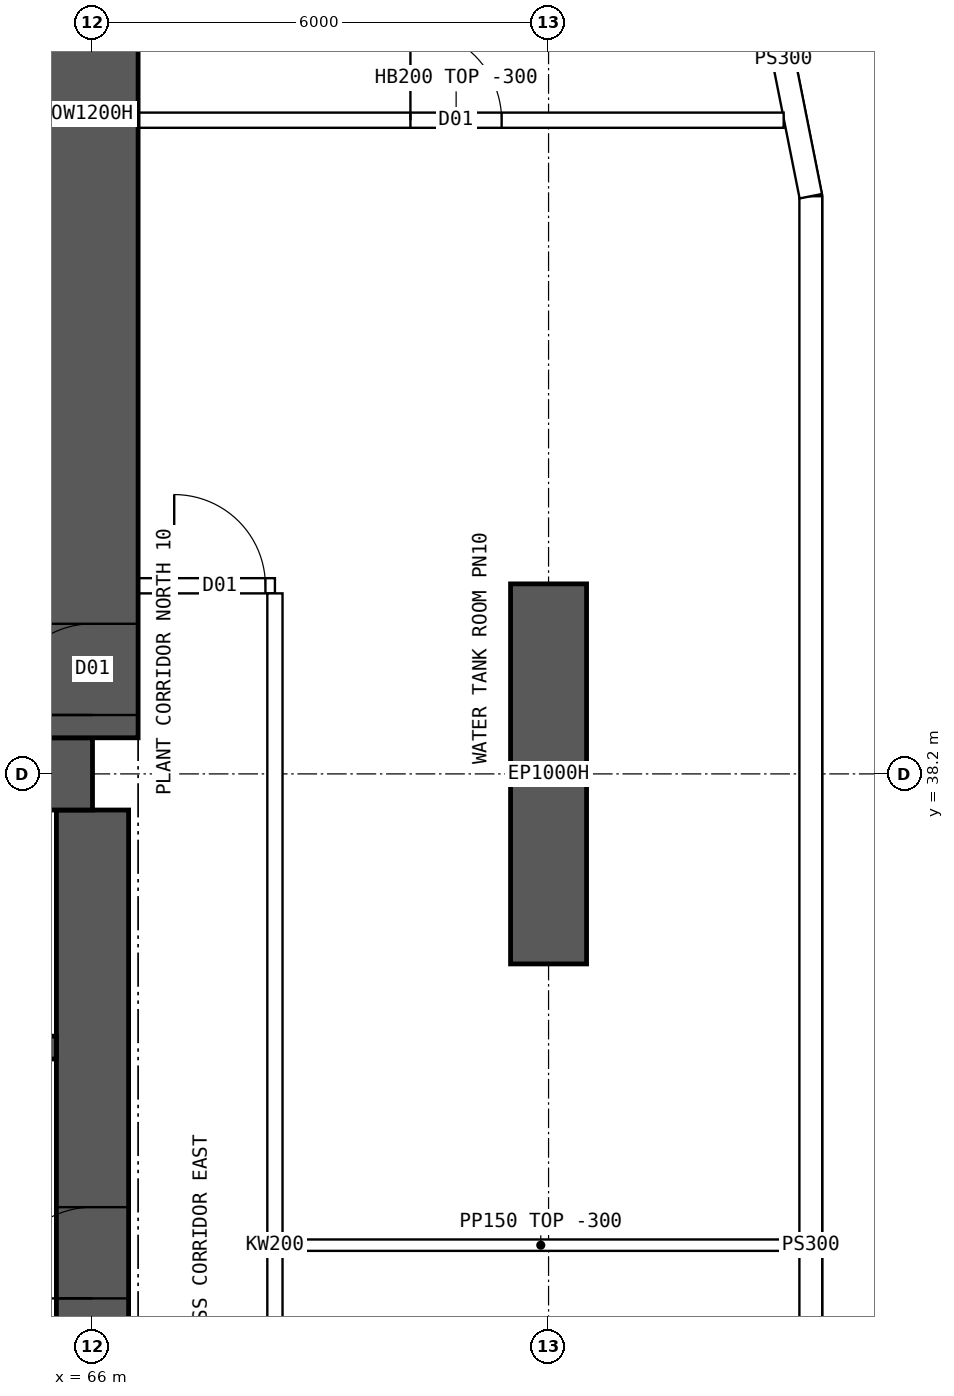
"""IFC4 building model, lengths in metres.
Left out: names, types, materials, properties, quantities, classifications, styles, units other than length and angle.
Written with IfcOpenShell. Run it as: python <this file> out.ifc"""

import sys

from ifc_helpers import new_model, si_unit, direction, frame, frame_2d, origin, place, context, subcontext, project, spatial, polyline, rectangle, outline, extrude, clip, halfspace, element, fill, save


model = new_model("IFC4")
c1 = context("Model", 3, precision=1e-05, world=origin(), true_north=direction((0.0, 1.0)))
c2 = subcontext(c1, "Body", "Model", "MODEL_VIEW")
j1 = project(units=[si_unit("LENGTHUNIT", "METRE"), si_unit("PLANEANGLEUNIT", "RADIAN")], contexts=[c1])
p1 = place(None, origin())
s1 = spatial("IfcSite", under=j1, at=p1, CompositionType="ELEMENT")
p2 = place(p1, origin())
s2 = spatial("IfcBuilding", under=s1, at=p2, CompositionType="ELEMENT")
p3 = place(p2, frame((0.0, 0.0, 133.15)))
s3 = spatial("IfcBuildingStorey", under=s2, at=p3, CompositionType="ELEMENT", Elevation=133.15)
p4 = place(p3, frame((72.0, 35.7, 0.0), z_axis=(0.0, 0.0, 1.0), x_axis=(0.0, 1.0, 0.0)))
e1 = element("IfcWall", 1, at=p4, inside=s3, PredefinedType="SHEAR", context=c2, shape_type="SweptSolid", body=[
    extrude(rectangle(XDim=5.0, YDim=1.0, at=frame_2d((2.5, 0.0))), origin(), (0.0, 0.0, 1.0), 7.2),
])
p5 = place(p3, frame((18.0, 38.2, 0.0), z_axis=(0.0, 0.0, 1.0), x_axis=(1.0, 0.0, 0.0)))
e2 = element("IfcWall", 2, at=p5, inside=s3, PredefinedType="SHEAR", context=c2, shape_type="SweptSolid", body=[
    extrude(rectangle(XDim=48.0, YDim=0.95, at=frame_2d((24.0, 0.0))), origin(), (0.0, 0.0, 1.0), 7.2),
])
p6 = place(p3, frame((66.0, 26.275, 0.0), z_axis=(0.0, 0.0, 1.0), x_axis=(0.0, 1.0, 0.0)))
e3 = element("IfcWall", 3, at=p6, inside=s3, PredefinedType="SHEAR", context=c2, shape_type="SweptSolid", body=[
    extrude(rectangle(XDim=11.45, YDim=0.95, at=frame_2d((5.725, 0.0))), origin(), (0.0, 0.0, 1.0), 7.2),
])
p7 = place(p6, frame((5.025, 0.0, 0.0)))
e4 = element("IfcOpeningElement", 4, at=p7, cuts=e3, PredefinedType="OPENING", context=c2, shape_type="SweptSolid", body=[
    extrude(rectangle(XDim=1.2, YDim=2.1, at=frame_2d((0.6, 1.05))), frame((0.0, 0.485, 0.0), z_axis=(0.0, -1.0, 0.0), x_axis=(1.0, 0.0, 0.0)), (0.0, 0.0, 1.0), 0.97),
])
p8 = place(p3, frame((18.475, 34.6, 0.0), z_axis=(0.0, 0.0, 1.0), x_axis=(1.0, 0.0, 0.0)))
e5 = element("IfcWall", 5, at=p8, inside=s3, PredefinedType="SHEAR", context=c2, shape_type="SweptSolid", body=[
    extrude(rectangle(XDim=47.05, YDim=0.3, at=frame_2d((23.525, 0.0))), origin(), (0.0, 0.0, 1.0), 7.2),
])
p9 = place(p8, frame((0.9, 0.0, 0.0)))
e6 = element("IfcOpeningElement", 6, at=p9, cuts=e5, PredefinedType="OPENING", context=c2, shape_type="SweptSolid", body=[
    extrude(rectangle(XDim=1.1, YDim=2.1, at=frame_2d((0.55, 1.05))), frame((0.0, 0.16, 0.0), z_axis=(0.0, -1.0, 0.0), x_axis=(1.0, 0.0, 0.0)), (0.0, 0.0, 1.0), 0.32),
])
p10 = place(p8, frame((45.05, 0.0, 0.0)))
e7 = element("IfcOpeningElement", 7, at=p10, cuts=e5, PredefinedType="OPENING", context=c2, shape_type="SweptSolid", body=[
    extrude(rectangle(XDim=1.1, YDim=2.1, at=frame_2d((0.55, 1.05))), frame((0.0, 0.16, 0.0), z_axis=(0.0, -1.0, 0.0), x_axis=(1.0, 0.0, 0.0)), (0.0, 0.0, 1.0), 0.32),
])
p11 = place(p8, frame((4.125, 0.0, 0.0)))
e8 = element("IfcOpeningElement", 8, at=p11, cuts=e5, PredefinedType="OPENING", context=c2, shape_type="SweptSolid", body=[
    extrude(rectangle(XDim=0.9, YDim=2.1, at=frame_2d((0.45, 1.05))), frame((0.0, 0.16, 0.0), z_axis=(0.0, -1.0, 0.0), x_axis=(1.0, 0.0, 0.0)), (0.0, 0.0, 1.0), 0.32),
])
p12 = place(p8, frame((42.025, 0.0, 0.0)))
e9 = element("IfcOpeningElement", 9, at=p12, cuts=e5, PredefinedType="OPENING", context=c2, shape_type="SweptSolid", body=[
    extrude(rectangle(XDim=0.9, YDim=2.1, at=frame_2d((0.45, 1.05))), frame((0.0, 0.16, 0.0), z_axis=(0.0, -1.0, 0.0), x_axis=(1.0, 0.0, 0.0)), (0.0, 0.0, 1.0), 0.32),
])
p13 = place(p8, frame((8.9, 0.0, 0.0)))
e10 = element("IfcOpeningElement", 10, at=p13, cuts=e5, PredefinedType="OPENING", context=c2, shape_type="SweptSolid", body=[
    extrude(rectangle(XDim=0.9, YDim=2.1, at=frame_2d((0.45, 1.05))), frame((0.0, 0.16, 0.0), z_axis=(0.0, -1.0, 0.0), x_axis=(1.0, 0.0, 0.0)), (0.0, 0.0, 1.0), 0.32),
])
p14 = place(p8, frame((12.874, 0.0, 0.0)))
e11 = element("IfcOpeningElement", 11, at=p14, cuts=e5, PredefinedType="OPENING", context=c2, shape_type="SweptSolid", body=[
    extrude(rectangle(XDim=0.9, YDim=2.1, at=frame_2d((0.45, 1.05))), frame((0.0, 0.16, 0.0), z_axis=(0.0, -1.0, 0.0), x_axis=(1.0, 0.0, 0.0)), (0.0, 0.0, 1.0), 0.32),
])
p15 = place(p8, frame((16.521, 0.0, 0.0)))
e12 = element("IfcOpeningElement", 12, at=p15, cuts=e5, PredefinedType="OPENING", context=c2, shape_type="SweptSolid", body=[
    extrude(rectangle(XDim=0.9, YDim=2.1, at=frame_2d((0.45, 1.05))), frame((0.0, 0.16, 0.0), z_axis=(0.0, -1.0, 0.0), x_axis=(1.0, 0.0, 0.0)), (0.0, 0.0, 1.0), 0.32),
])
p16 = place(p8, frame((20.28, 0.0, 0.0)))
e13 = element("IfcOpeningElement", 13, at=p16, cuts=e5, PredefinedType="OPENING", context=c2, shape_type="SweptSolid", body=[
    extrude(rectangle(XDim=0.9, YDim=2.1, at=frame_2d((0.45, 1.05))), frame((0.0, 0.16, 0.0), z_axis=(0.0, -1.0, 0.0), x_axis=(1.0, 0.0, 0.0)), (0.0, 0.0, 1.0), 0.32),
])
p17 = place(p8, frame((24.686, 0.0, 0.0)))
e14 = element("IfcOpeningElement", 14, at=p17, cuts=e5, PredefinedType="OPENING", context=c2, shape_type="SweptSolid", body=[
    extrude(rectangle(XDim=0.9, YDim=2.1, at=frame_2d((0.45, 1.05))), frame((0.0, 0.16, 0.0), z_axis=(0.0, -1.0, 0.0), x_axis=(1.0, 0.0, 0.0)), (0.0, 0.0, 1.0), 0.32),
])
p18 = place(p8, frame((27.483, 0.0, 0.0)))
e15 = element("IfcOpeningElement", 15, at=p18, cuts=e5, PredefinedType="OPENING", context=c2, shape_type="SweptSolid", body=[
    extrude(rectangle(XDim=0.9, YDim=2.1, at=frame_2d((0.45, 1.05))), frame((0.0, 0.16, 0.0), z_axis=(0.0, -1.0, 0.0), x_axis=(1.0, 0.0, 0.0)), (0.0, 0.0, 1.0), 0.32),
])
p19 = place(p8, frame((33.604, 0.0, 0.0)))
e16 = element("IfcOpeningElement", 16, at=p19, cuts=e5, PredefinedType="OPENING", context=c2, shape_type="SweptSolid", body=[
    extrude(rectangle(XDim=0.9, YDim=2.1, at=frame_2d((0.45, 1.05))), frame((0.0, 0.16, 0.0), z_axis=(0.0, -1.0, 0.0), x_axis=(1.0, 0.0, 0.0)), (0.0, 0.0, 1.0), 0.32),
])
p20 = place(p3, frame((66.0, 38.675, 0.0), z_axis=(0.0, 0.0, 1.0), x_axis=(0.0, 1.0, 0.0)))
e17 = element("IfcWall", 17, at=p20, inside=s3, PredefinedType="SHEAR", context=c2, shape_type="SweptSolid", body=[
    extrude(rectangle(XDim=16.425, YDim=1.2, at=frame_2d((8.212, 0.0))), origin(), (0.0, 0.0, 1.0), 7.2),
])
p21 = place(p20, frame((0.3, 0.0, 0.0)))
e18 = element("IfcOpeningElement", 18, at=p21, cuts=e17, PredefinedType="OPENING", context=c2, shape_type="SweptSolid", body=[
    extrude(rectangle(XDim=1.2, YDim=2.1, at=frame_2d((0.6, 1.05))), frame((0.0, 0.61, 0.0), z_axis=(0.0, -1.0, 0.0), x_axis=(1.0, 0.0, 0.0)), (0.0, 0.0, 1.0), 1.22),
])
p22 = place(p20, frame((11.375, 0.0, 0.0)))
e19 = element("IfcOpeningElement", 19, at=p22, cuts=e17, PredefinedType="OPENING", context=c2, shape_type="SweptSolid", body=[
    extrude(rectangle(XDim=1.2, YDim=2.1, at=frame_2d((0.6, 1.05))), frame((0.0, 0.61, 0.0), z_axis=(0.0, -1.0, 0.0), x_axis=(1.0, 0.0, 0.0)), (0.0, 0.0, 1.0), 1.22),
])
p23 = place(p3, frame((75.45, 18.2, 0.0), z_axis=(0.0, 0.0, 1.0), x_axis=(0.0, 1.0, 0.0)))
e20 = element("IfcWall", 20, at=p23, inside=s3, PredefinedType="SOLIDWALL", context=c2, shape_type="SweptSolid", body=[
    extrude(outline(polyline([(-0.015, -0.15), (27.615, -0.15), (27.585, 0.15), (0.015, 0.15), (-0.015, -0.15)])), origin(), (0.0, 0.0, 1.0), 6.9),
])
p24 = place(p3, frame((75.45, 45.8, 0.0), z_axis=(0.0, 0.0, 1.0), x_axis=(-0.195059183267, 0.980791473772, 0.0)))
e21 = element("IfcWall", 21, at=p24, inside=s3, PredefinedType="SOLIDWALL", context=c2, shape_type="SweptSolid", body=[
    extrude(outline(polyline([(-0.015, -0.15), (3.717, -0.15), (3.657, 0.15), (0.015, 0.15), (-0.015, -0.15)])), origin(), (0.0, 0.0, 1.0), 6.9),
])
p25 = place(p3, frame((15.6, 40.675, 0.0), z_axis=(0.0, 0.0, 1.0), x_axis=(1.0, 0.0, 0.0)))
e22 = element("IfcWall", 22, at=p25, inside=s3, PredefinedType="SOLIDWALL", context=c2, shape_type="SweptSolid", body=[
    extrude(rectangle(XDim=52.8, YDim=0.2, at=frame_2d((26.4, 0.0))), origin(), (0.0, 0.0, 1.0), 6.9),
])
p26 = place(p25, frame((0.6, 0.0, 0.0)))
e23 = element("IfcOpeningElement", 23, at=p26, cuts=e22, PredefinedType="OPENING", context=c2, shape_type="SweptSolid", body=[
    extrude(rectangle(XDim=1.2, YDim=2.1, at=frame_2d((0.6, 1.05))), frame((0.0, 0.11, 0.0), z_axis=(0.0, -1.0, 0.0), x_axis=(1.0, 0.0, 0.0)), (0.0, 0.0, 1.0), 0.22),
])
p27 = place(p25, frame((3.475, 0.0, 0.0)))
e24 = element("IfcOpeningElement", 24, at=p27, cuts=e22, PredefinedType="OPENING", context=c2, shape_type="SweptSolid", body=[
    extrude(rectangle(XDim=1.8, YDim=2.4, at=frame_2d((0.9, 1.2))), frame((0.0, 0.11, 0.0), z_axis=(0.0, -1.0, 0.0), x_axis=(1.0, 0.0, 0.0)), (0.0, 0.0, 1.0), 0.22),
])
p28 = place(p25, frame((9.475, 0.0, 0.0)))
e25 = element("IfcOpeningElement", 25, at=p28, cuts=e22, PredefinedType="OPENING", context=c2, shape_type="SweptSolid", body=[
    extrude(rectangle(XDim=1.8, YDim=2.4, at=frame_2d((0.9, 1.2))), frame((0.0, 0.11, 0.0), z_axis=(0.0, -1.0, 0.0), x_axis=(1.0, 0.0, 0.0)), (0.0, 0.0, 1.0), 0.22),
])
p29 = place(p25, frame((15.475, 0.0, 0.0)))
e26 = element("IfcOpeningElement", 26, at=p29, cuts=e22, PredefinedType="OPENING", context=c2, shape_type="SweptSolid", body=[
    extrude(rectangle(XDim=1.8, YDim=2.4, at=frame_2d((0.9, 1.2))), frame((0.0, 0.11, 0.0), z_axis=(0.0, -1.0, 0.0), x_axis=(1.0, 0.0, 0.0)), (0.0, 0.0, 1.0), 0.22),
])
p30 = place(p25, frame((21.475, 0.0, 0.0)))
e27 = element("IfcOpeningElement", 27, at=p30, cuts=e22, PredefinedType="OPENING", context=c2, shape_type="SweptSolid", body=[
    extrude(rectangle(XDim=1.8, YDim=2.4, at=frame_2d((0.9, 1.2))), frame((0.0, 0.11, 0.0), z_axis=(0.0, -1.0, 0.0), x_axis=(1.0, 0.0, 0.0)), (0.0, 0.0, 1.0), 0.22),
])
p31 = place(p25, frame((27.475, 0.0, 0.0)))
e28 = element("IfcOpeningElement", 28, at=p31, cuts=e22, PredefinedType="OPENING", context=c2, shape_type="SweptSolid", body=[
    extrude(rectangle(XDim=1.8, YDim=2.4, at=frame_2d((0.9, 1.2))), frame((0.0, 0.11, 0.0), z_axis=(0.0, -1.0, 0.0), x_axis=(1.0, 0.0, 0.0)), (0.0, 0.0, 1.0), 0.22),
])
p32 = place(p25, frame((33.475, 0.0, 0.0)))
e29 = element("IfcOpeningElement", 29, at=p32, cuts=e22, PredefinedType="OPENING", context=c2, shape_type="SweptSolid", body=[
    extrude(rectangle(XDim=1.8, YDim=2.4, at=frame_2d((0.9, 1.2))), frame((0.0, 0.11, 0.0), z_axis=(0.0, -1.0, 0.0), x_axis=(1.0, 0.0, 0.0)), (0.0, 0.0, 1.0), 0.22),
])
p33 = place(p25, frame((39.475, 0.0, 0.0)))
e30 = element("IfcOpeningElement", 30, at=p33, cuts=e22, PredefinedType="OPENING", context=c2, shape_type="SweptSolid", body=[
    extrude(rectangle(XDim=1.8, YDim=2.4, at=frame_2d((0.9, 1.2))), frame((0.0, 0.11, 0.0), z_axis=(0.0, -1.0, 0.0), x_axis=(1.0, 0.0, 0.0)), (0.0, 0.0, 1.0), 0.22),
])
p34 = place(p25, frame((45.475, 0.0, 0.0)))
e31 = element("IfcOpeningElement", 31, at=p34, cuts=e22, PredefinedType="OPENING", context=c2, shape_type="SweptSolid", body=[
    extrude(rectangle(XDim=1.8, YDim=2.4, at=frame_2d((0.9, 1.2))), frame((0.0, 0.11, 0.0), z_axis=(0.0, -1.0, 0.0), x_axis=(1.0, 0.0, 0.0)), (0.0, 0.0, 1.0), 0.22),
])
p35 = place(p25, frame((51.475, 0.0, 0.0)))
e32 = element("IfcOpeningElement", 32, at=p35, cuts=e22, PredefinedType="OPENING", context=c2, shape_type="SweptSolid", body=[
    extrude(rectangle(XDim=1.2, YDim=2.1, at=frame_2d((0.6, 1.05))), frame((0.0, 0.11, 0.0), z_axis=(0.0, -1.0, 0.0), x_axis=(1.0, 0.0, 0.0)), (0.0, 0.0, 1.0), 0.22),
])
p36 = place(p3, frame((68.4, 23.425, 0.0), z_axis=(0.0, 0.0, 1.0), x_axis=(0.0, 1.0, 0.0)))
e33 = element("IfcWall", 33, at=p36, inside=s3, PredefinedType="SOLIDWALL", context=c2, shape_type="SweptSolid", body=[
    extrude(rectangle(XDim=17.15, YDim=0.2, at=frame_2d((8.575, 0.0))), origin(), (0.0, 0.0, 1.0), 6.9),
])
p37 = place(p3, frame((60.475, 46.8, 0.0), z_axis=(0.0, 0.0, 1.0), x_axis=(1.0, 0.0, 0.0)))
e34 = element("IfcWall", 34, at=p37, inside=s3, PredefinedType="SOLIDWALL", context=c2, shape_type="SweptSolid", body=[
    extrude(rectangle(XDim=5.05, YDim=0.2, at=frame_2d((2.525, 0.0))), origin(), (0.0, 0.0, 1.0), 6.9),
])
p38 = place(p37, frame((1.925, 0.0, 0.0)))
e35 = element("IfcOpeningElement", 35, at=p38, cuts=e34, PredefinedType="OPENING", context=c2, shape_type="SweptSolid", body=[
    extrude(rectangle(XDim=1.2, YDim=2.1, at=frame_2d((0.6, 1.05))), frame((0.0, 0.11, 0.0), z_axis=(0.0, -1.0, 0.0), x_axis=(1.0, 0.0, 0.0)), (0.0, 0.0, 1.0), 0.22),
])
p39 = place(p3, frame((66.475, 46.8, 0.0), z_axis=(0.0, 0.0, 1.0), x_axis=(1.0, 0.0, 0.0)))
e36 = element("IfcWall", 36, at=p39, inside=s3, PredefinedType="SOLIDWALL", context=c2, shape_type="Clipping", body=[
    clip(clip(extrude(outline(polyline([(-0.03, 0.0), (8.648, 0.0), (8.648, 6.9), (5.827, 6.9), (5.825, 6.45), (5.227, 6.45), (5.225, 6.9), (-0.03, 6.9), (-0.03, 0.0)])), frame((0.0, 0.1, 0.0), z_axis=(0.0, -1.0, 0.0), x_axis=(1.0, 0.0, 0.0)), (0.0, 0.0, 1.0), 0.2), halfspace(frame((0.0, 0.0, 0.0), z_axis=(-1.0, 0.0, 0.0)), False)), halfspace(frame((8.618, 0.0, 0.0), z_axis=(0.98078778892, 0.195077710428, 0.0)), False)),
])
p40 = place(p39, frame((3.708, 0.0, 0.0)))
e37 = element("IfcOpeningElement", 37, at=p40, cuts=e36, PredefinedType="OPENING", context=c2, shape_type="SweptSolid", body=[
    extrude(rectangle(XDim=1.2, YDim=2.1, at=frame_2d((0.6, 1.05))), frame((0.0, 0.11, 0.0), z_axis=(0.0, -1.0, 0.0), x_axis=(1.0, 0.0, 0.0)), (0.0, 0.0, 1.0), 0.22),
])
p41 = place(p3, frame((68.5, 32.0, 0.0), z_axis=(0.0, 0.0, 1.0), x_axis=(1.0, 0.0, 0.0)))
e38 = element("IfcWall", 38, at=p41, inside=s3, PredefinedType="PARTITIONING", context=c2, shape_type="SweptSolid", body=[
    extrude(outline(polyline([(0.0, 0.0), (6.795, 0.0), (6.795, 6.9), (3.802, 6.9), (3.8, 6.45), (3.202, 6.45), (3.2, 6.9), (0.0, 6.9), (0.0, 0.0)])), frame((0.0, 0.075, 0.0), z_axis=(0.0, -1.0, 0.0), x_axis=(1.0, 0.0, 0.0)), (0.0, 0.0, 1.0), 0.15),
])
p42 = place(p7, origin())
e39 = element("IfcDoor", 39, at=p42, inside=s3, OperationType="SINGLE_SWING_LEFT", PredefinedType="DOOR", context=c2, shape_type="SweptSolid", body=[
    extrude(rectangle(XDim=1.2, YDim=2.1, at=frame_2d((0.6, 1.05))), frame((0.0, 0.025, 0.0), z_axis=(0.0, -1.0, 0.0), x_axis=(1.0, 0.0, 0.0)), (0.0, 0.0, 1.0), 0.05),
])
fill(e4, e39)
p43 = place(p40, origin())
e40 = element("IfcDoor", 40, at=p43, inside=s3, OperationType="SINGLE_SWING_LEFT", PredefinedType="DOOR", context=c2, shape_type="SweptSolid", body=[
    extrude(rectangle(XDim=1.2, YDim=2.1, at=frame_2d((0.6, 1.05))), frame((0.0, 0.025, 0.0), z_axis=(0.0, -1.0, 0.0), x_axis=(1.0, 0.0, 0.0)), (0.0, 0.0, 1.0), 0.05),
])
fill(e37, e40)
p44 = place(p35, origin())
e41 = element("IfcDoor", 41, at=p44, inside=s3, OperationType="SINGLE_SWING_LEFT", PredefinedType="DOOR", context=c2, shape_type="SweptSolid", body=[
    extrude(rectangle(XDim=1.2, YDim=2.1, at=frame_2d((0.6, 1.05))), frame((0.0, 0.025, 0.0), z_axis=(0.0, -1.0, 0.0), x_axis=(1.0, 0.0, 0.0)), (0.0, 0.0, 1.0), 0.05),
])
fill(e32, e41)
p45 = place(p21, origin())
e42 = element("IfcDoor", 42, at=p45, inside=s3, OperationType="SINGLE_SWING_LEFT", PredefinedType="DOOR", context=c2, shape_type="SweptSolid", body=[
    extrude(rectangle(XDim=1.2, YDim=2.1, at=frame_2d((0.6, 1.05))), frame((0.0, 0.025, 0.0), z_axis=(0.0, -1.0, 0.0), x_axis=(1.0, 0.0, 0.0)), (0.0, 0.0, 1.0), 0.05),
])
fill(e18, e42)
save(model, sys.argv[1])
